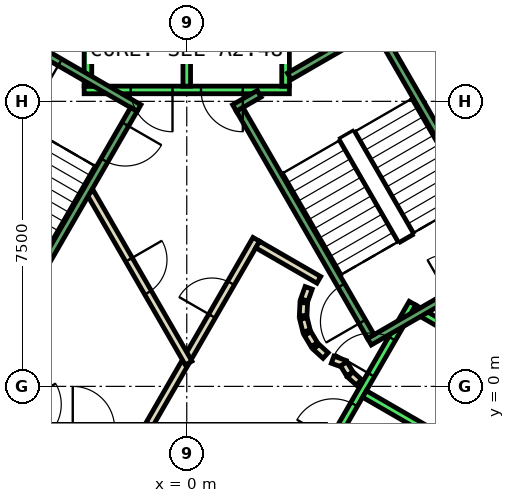
"""IFC4 building model, lengths in metres.
Left out: names, types, materials, properties, quantities, classifications, styles, units other than length and angle.
Written with IfcOpenShell. Run it as: python <this file> out.ifc"""

import sys

from ifc_helpers import new_model, si_unit, direction, frame, frame_2d, origin, place, context, subcontext, project, spatial, polyline, rectangle, outline, extrude, element, fill, save


model = new_model("IFC4")
c1 = context("Model", 3, precision=1e-05, world=origin(), true_north=direction((0.0, 1.0)))
c2 = subcontext(c1, "Body", "Model", "MODEL_VIEW")
j1 = project(units=[si_unit("LENGTHUNIT", "METRE"), si_unit("PLANEANGLEUNIT", "RADIAN")], contexts=[c1])
p1 = place(None, origin())
s1 = spatial("IfcSite", under=j1, at=p1, CompositionType="ELEMENT")
p2 = place(p1, origin())
s2 = spatial("IfcBuilding", under=s1, at=p2, CompositionType="ELEMENT")
p3 = place(p2, frame((0.0, 0.0, 231.8)))
s3 = spatial("IfcBuildingStorey", under=s2, at=p3, CompositionType="ELEMENT", Elevation=231.8)
p4 = place(p3, frame((0.0, 0.0, -0.4)))
e1 = element("IfcWall", 1, at=p4, inside=s3, PredefinedType="SHEAR", context=c2, shape_type="SweptSolid", body=[
    extrude(outline(polyline([(6.64, -9.0), (13.279, 2.5), (11.662, 2.5), (5.831, -7.6), (6.64, -9.0)])), origin(), (0.0, 0.0, 1.0), 4.0),
])
p5 = place(p3, frame((5.751, -3.938, 0.0), z_axis=(0.0, 0.0, 1.0), x_axis=(0.500034260056, 0.866005622828, 0.0)))
e2 = element("IfcWall", 2, at=p5, inside=s3, PredefinedType="PARTITIONING", context=c2, shape_type="SweptSolid", body=[
    extrude(rectangle(XDim=5.399, YDim=0.2, at=frame_2d((2.7, 0.0))), origin(), (0.0, 0.0, 1.0), 3.6),
])
p6 = place(p3, frame((-0.982, -1.0, 0.0), z_axis=(0.0, 0.0, 1.0), x_axis=(0.50024047865, 0.865886518847, 0.0)))
e3 = element("IfcWall", 3, at=p6, inside=s3, PredefinedType="PARTITIONING", context=c2, shape_type="SweptSolid", body=[
    extrude(rectangle(XDim=1.863, YDim=0.2, at=frame_2d((0.931, 0.0))), origin(), (0.0, 0.0, 1.0), 3.6),
])
p7 = place(p3, frame((0.05, 0.787, 0.0), z_axis=(0.0, 0.0, 1.0), x_axis=(0.499954076797, 0.866051915934, 0.0)))
e4 = element("IfcWall", 4, at=p7, inside=s3, PredefinedType="PARTITIONING", context=c2, shape_type="SweptSolid", body=[
    extrude(rectangle(XDim=3.558, YDim=0.2, at=frame_2d((1.779, 0.0))), origin(), (0.0, 0.0, 1.0), 3.6),
])
p8 = place(p7, frame((1.229, 0.0, 0.0)))
e5 = element("IfcOpeningElement", 5, at=p8, cuts=e4, PredefinedType="OPENING", context=c2, shape_type="SweptSolid", body=[
    extrude(rectangle(XDim=1.0, YDim=2.1, at=frame_2d((0.5, 1.05))), frame((0.0, 0.11, 0.0), z_axis=(0.0, -1.0, 0.0), x_axis=(1.0, 0.0, 0.0)), (0.0, 0.0, 1.0), 0.22),
])
p9 = place(p3, frame((1.866, 3.732, 0.0), z_axis=(0.0, 0.0, 1.0), x_axis=(0.866043361281, -0.499968895414, 0.0)))
e6 = element("IfcWall", 6, at=p9, inside=s3, PredefinedType="PARTITIONING", context=c2, shape_type="SweptSolid", body=[
    extrude(rectangle(XDim=1.858, YDim=0.2, at=frame_2d((0.929, 0.0))), origin(), (0.0, 0.0, 1.0), 3.6),
])
p10 = place(p3, frame((3.208, 2.592, 0.0), z_axis=(0.0, 0.0, 1.0), x_axis=(-0.337388820924, -0.941365382578, 0.0)))
e7 = element("IfcWall", 7, at=p10, inside=s3, PredefinedType="PARTITIONING", context=c2, shape_type="SweptSolid", body=[
    extrude(rectangle(XDim=0.338, YDim=0.2, at=frame_2d((0.169, 0.0))), origin(), (0.0, 0.0, 1.0), 3.6),
])
p11 = place(p3, frame((3.079, 2.199, 0.0), z_axis=(0.0, 0.0, 1.0), x_axis=(-0.047771483479, -0.998858290933, 0.0)))
e8 = element("IfcWall", 8, at=p11, inside=s3, PredefinedType="PARTITIONING", context=c2, shape_type="SweptSolid", body=[
    extrude(rectangle(XDim=0.337, YDim=0.2, at=frame_2d((0.169, 0.0))), origin(), (0.0, 0.0, 1.0), 3.6),
])
p12 = place(p3, frame((3.07, 1.786, 0.0), z_axis=(0.0, 0.0, 1.0), x_axis=(0.242705583207, -0.970099994784, 0.0)))
e9 = element("IfcWall", 9, at=p12, inside=s3, PredefinedType="PARTITIONING", context=c2, shape_type="SweptSolid", body=[
    extrude(rectangle(XDim=0.338, YDim=0.2, at=frame_2d((0.169, 0.0))), origin(), (0.0, 0.0, 1.0), 3.6),
])
for number, where, z_axis, x_axis in (
    (10, (3.182, 1.388, 0.0), (0.0, 0.0, 1.0), (0.512, -0.859, 0.0)),
    (11, (3.404, 1.039, 0.0), (0.0, 0.0, 1.0), (0.74, -0.672, 0.0)),
):
    element("IfcWall", number, at=place(p3, frame(where, z_axis=z_axis, x_axis=x_axis)), inside=s3, PredefinedType="PARTITIONING", context=c2, shape_type="SweptSolid", body=[
        extrude(rectangle(XDim=0.338, YDim=0.2, at=frame_2d((0.169, 0.0))), origin(), (0.0, 0.0, 1.0), 3.6),
    ])
p13 = place(p3, frame((3.838, 0.702, 0.0), z_axis=(0.0, 0.0, 1.0), x_axis=(0.941035081519, -0.338308993895, 0.0)))
e12 = element("IfcWall", 12, at=p13, inside=s3, PredefinedType="PARTITIONING", context=c2, shape_type="SweptSolid", body=[
    extrude(rectangle(XDim=0.337, YDim=0.2, at=frame_2d((0.168, 0.0))), origin(), (0.0, 0.0, 1.0), 3.6),
])
p14 = place(p3, frame((4.132, 0.593, 0.0), z_axis=(0.0, 0.0, 1.0), x_axis=(0.513561617048, -0.858052717201, 0.0)))
e13 = element("IfcWall", 13, at=p14, inside=s3, PredefinedType="PARTITIONING", context=c2, shape_type="SweptSolid", body=[
    extrude(rectangle(XDim=0.308, YDim=0.2, at=frame_2d((0.154, 0.0))), origin(), (0.0, 0.0, 1.0), 3.6),
])
p15 = place(p3, frame((4.301, 0.315, 0.0), z_axis=(0.0, 0.0, 1.0), x_axis=(0.741798017506, -0.670623367639, 0.0)))
e14 = element("IfcWall", 14, at=p15, inside=s3, PredefinedType="PARTITIONING", context=c2, shape_type="SweptSolid", body=[
    extrude(rectangle(XDim=0.309, YDim=0.2, at=frame_2d((0.154, 0.0))), origin(), (0.0, 0.0, 1.0), 3.6),
])
p16 = place(p3, frame((-2.54, 5.1, 0.0), z_axis=(0.0, 0.0, 1.0), x_axis=(0.499925051871, -0.866068670783, 0.0)))
e15 = element("IfcWall", 15, at=p16, inside=s3, PredefinedType="PARTITIONING", context=c2, shape_type="SweptSolid", body=[
    extrude(rectangle(XDim=5.181, YDim=0.2, at=frame_2d((2.59, 0.0))), origin(), (0.0, 0.0, 1.0), 3.6),
])
p17 = place(p16, frame((2.04, 0.0, 0.0)))
e16 = element("IfcOpeningElement", 16, at=p17, cuts=e15, PredefinedType="OPENING", context=c2, shape_type="SweptSolid", body=[
    extrude(rectangle(XDim=1.0, YDim=2.1, at=frame_2d((0.5, 1.05))), frame((0.0, 0.11, 0.0), z_axis=(0.0, -1.0, 0.0), x_axis=(1.0, 0.0, 0.0)), (0.0, 0.0, 1.0), 0.22),
])
p18 = place(p3, frame((2.7, 7.8, 0.0), z_axis=(0.0, 0.0, 1.0), x_axis=(-1.0, 0.0, 0.0)))
e17 = element("IfcWall", 17, at=p18, inside=s3, PredefinedType="STANDARD", context=c2, shape_type="SweptSolid", body=[
    extrude(rectangle(XDim=5.4, YDim=0.2, at=frame_2d((2.7, 0.0))), origin(), (0.0, 0.0, 1.0), 3.6),
])
p19 = place(p18, frame((1.225, 0.0, 0.0)))
e18 = element("IfcOpeningElement", 18, at=p19, cuts=e17, PredefinedType="OPENING", context=c2, shape_type="SweptSolid", body=[
    extrude(rectangle(XDim=1.1, YDim=2.1, at=frame_2d((0.55, 1.05))), frame((0.0, 0.11, 0.0), z_axis=(0.0, -1.0, 0.0), x_axis=(1.0, 0.0, 0.0)), (0.0, 0.0, 1.0), 0.22),
])
p20 = place(p18, frame((3.075, 0.0, 0.0)))
e19 = element("IfcOpeningElement", 19, at=p20, cuts=e17, PredefinedType="OPENING", context=c2, shape_type="SweptSolid", body=[
    extrude(rectangle(XDim=1.1, YDim=2.1, at=frame_2d((0.55, 1.05))), frame((0.0, 0.11, 0.0), z_axis=(0.0, -1.0, 0.0), x_axis=(1.0, 0.0, 0.0)), (0.0, 0.0, 1.0), 0.22),
])
for number, where, z_axis, x_axis in (
    (20, (2.6, 7.9, 0.0), (0.0, 0.0, 1.0), (0.0, 1.0, 0.0)),
    (21, (0.0, 7.9, 0.0), (0.0, 0.0, 1.0), (0.0, 1.0, 0.0)),
    (22, (-2.6, 7.9, 0.0), (0.0, 0.0, 1.0), (0.0, 1.0, 0.0)),
):
    element("IfcWall", number, at=place(p3, frame(where, z_axis=z_axis, x_axis=x_axis)), inside=s3, PredefinedType="STANDARD", context=c2, shape_type="SweptSolid", body=[
        extrude(rectangle(XDim=2.4, YDim=0.2, at=frame_2d((1.2, 0.0))), origin(), (0.0, 0.0, 1.0), 3.6),
    ])
p21 = place(p3, frame((-5.94, 2.188, 0.0), z_axis=(0.0, 0.0, 1.0), x_axis=(0.500034260056, -0.866005622828, 0.0)))
e23 = element("IfcWall", 23, at=p21, inside=s3, PredefinedType="STANDARD", context=c2, shape_type="SweptSolid", body=[
    extrude(rectangle(XDim=5.399, YDim=0.2, at=frame_2d((2.7, 0.0))), origin(), (0.0, 0.0, 1.0), 3.6),
])
p22 = place(p21, frame((3.075, 0.0, 0.0)))
e24 = element("IfcOpeningElement", 24, at=p22, cuts=e23, PredefinedType="OPENING", context=c2, shape_type="SweptSolid", body=[
    extrude(rectangle(XDim=1.1, YDim=2.1, at=frame_2d((0.55, 1.05))), frame((0.0, 0.11, 0.0), z_axis=(0.0, -1.0, 0.0), x_axis=(1.0, 0.0, 0.0)), (0.0, 0.0, 1.0), 0.22),
])
p23 = place(p21, frame((1.225, 0.0, 0.0)))
e25 = element("IfcOpeningElement", 25, at=p23, cuts=e23, PredefinedType="OPENING", context=c2, shape_type="SweptSolid", body=[
    extrude(rectangle(XDim=1.1, YDim=2.1, at=frame_2d((0.55, 1.05))), frame((0.0, 0.11, 0.0), z_axis=(0.0, -1.0, 0.0), x_axis=(1.0, 0.0, 0.0)), (0.0, 0.0, 1.0), 0.22),
])
p24 = place(p3, frame((3.24, -2.488, 0.0), z_axis=(0.0, 0.0, 1.0), x_axis=(0.500034260056, 0.866005622828, 0.0)))
e26 = element("IfcWall", 26, at=p24, inside=s3, PredefinedType="STANDARD", context=c2, shape_type="SweptSolid", body=[
    extrude(rectangle(XDim=5.399, YDim=0.2, at=frame_2d((2.7, 0.0))), origin(), (0.0, 0.0, 1.0), 3.6),
])
p25 = place(p24, frame((3.225, 0.0, 0.0)))
e27 = element("IfcOpeningElement", 27, at=p25, cuts=e26, PredefinedType="OPENING", context=c2, shape_type="SweptSolid", body=[
    extrude(rectangle(XDim=1.1, YDim=2.1, at=frame_2d((0.55, 1.05))), frame((0.0, 0.11, 0.0), z_axis=(0.0, -1.0, 0.0), x_axis=(1.0, 0.0, 0.0)), (0.0, 0.0, 1.0), 0.22),
])
p26 = place(p24, frame((1.225, 0.0, 0.0)))
e28 = element("IfcOpeningElement", 28, at=p26, cuts=e26, PredefinedType="OPENING", context=c2, shape_type="SweptSolid", body=[
    extrude(rectangle(XDim=1.1, YDim=2.1, at=frame_2d((0.55, 1.05))), frame((0.0, 0.11, 0.0), z_axis=(0.0, -1.0, 0.0), x_axis=(1.0, 0.0, 0.0)), (0.0, 0.0, 1.0), 0.22),
])
p27 = place(p3, frame((5.492, -3.788, 0.0), z_axis=(0.0, 0.0, 1.0), x_axis=(0.500034260056, 0.866005622828, 0.0)))
e29 = element("IfcWall", 29, at=p27, inside=s3, PredefinedType="STANDARD", context=c2, shape_type="SweptSolid", body=[
    extrude(rectangle(XDim=5.399, YDim=0.2, at=frame_2d((2.7, 0.0))), origin(), (0.0, 0.0, 1.0), 3.6),
])
for number, where, z_axis, x_axis in (
    (30, (4.677, -0.2, 0.0), (0.0, 0.0, 1.0), (0.866, -0.5, 0.0)),
    (31, (5.977, 2.052, 0.0), (0.0, 0.0, 1.0), (0.866, -0.5, 0.0)),
):
    element("IfcWall", number, at=place(p3, frame(where, z_axis=z_axis, x_axis=x_axis)), inside=s3, PredefinedType="STANDARD", context=c2, shape_type="SweptSolid", body=[
        extrude(rectangle(XDim=2.399, YDim=0.2, at=frame_2d((1.2, 0.0))), origin(), (0.0, 0.0, 1.0), 3.6),
    ])
p28 = place(p3, frame((4.806, 1.176, 0.0), z_axis=(0.0, 0.0, 1.0), x_axis=(0.866059941101, 0.499940174841, 0.0)))
e32 = element("IfcWall", 32, at=p28, inside=s3, PredefinedType="STANDARD", context=c2, shape_type="SweptSolid", body=[
    extrude(rectangle(XDim=4.4, YDim=0.2, at=frame_2d((2.2, 0.0))), origin(), (0.0, 0.0, 1.0), 3.6),
])
p29 = place(p28, frame((2.4, 0.0, 0.0)))
e33 = element("IfcOpeningElement", 33, at=p29, cuts=e32, PredefinedType="OPENING", context=c2, shape_type="SweptSolid", body=[
    extrude(rectangle(XDim=1.1, YDim=2.2, at=frame_2d((0.55, 1.1))), frame((0.0, 0.11, 0.0), z_axis=(0.0, -1.0, 0.0), x_axis=(1.0, 0.0, 0.0)), (0.0, 0.0, 1.0), 0.22),
])
p30 = place(p3, frame((2.7, 8.158, 0.0), z_axis=(0.0, 0.0, 1.0), x_axis=(0.86611865017, 0.499838457731, 0.0)))
e34 = element("IfcWall", 34, at=p30, inside=s3, PredefinedType="STANDARD", context=c2, shape_type="SweptSolid", body=[
    extrude(rectangle(XDim=2.733, YDim=0.2, at=frame_2d((1.366, 0.0))), origin(), (0.0, 0.0, 1.0), 3.6),
])
p31 = place(p3, frame((1.256, 7.324, 0.0), z_axis=(0.0, 0.0, 1.0), x_axis=(0.865915093549, 0.500191014278, 0.0)))
e35 = element("IfcWall", 35, at=p31, inside=s3, PredefinedType="STANDARD", context=c2, shape_type="SweptSolid", body=[
    extrude(rectangle(XDim=0.752, YDim=0.2, at=frame_2d((0.376, 0.0))), origin(), (0.0, 0.0, 1.0), 3.6),
])
p32 = place(p3, frame((4.843, 1.312, 0.0), z_axis=(0.0, 0.0, 1.0), x_axis=(-0.499963383562, 0.866046543262, 0.0)))
e36 = element("IfcWall", 36, at=p32, inside=s3, PredefinedType="STANDARD", context=c2, shape_type="SweptSolid", body=[
    extrude(rectangle(XDim=6.9, YDim=0.2, at=frame_2d((3.45, 0.0))), origin(), (0.0, 0.0, 1.0), 3.6),
])
p33 = place(p32, frame((0.45, 0.0, 0.0)))
e37 = element("IfcOpeningElement", 37, at=p33, cuts=e36, PredefinedType="OPENING", context=c2, shape_type="SweptSolid", body=[
    extrude(rectangle(XDim=1.1, YDim=2.2, at=frame_2d((0.55, 1.1))), frame((0.0, 0.11, 0.0), z_axis=(0.0, -1.0, 0.0), x_axis=(1.0, 0.0, 0.0)), (0.0, 0.0, 1.0), 0.22),
])
p34 = place(p3, frame((8.48, 3.412, 0.0), z_axis=(0.0, 0.0, 1.0), x_axis=(-0.499978703459, 0.866037698999, 0.0)))
e38 = element("IfcWall", 38, at=p34, inside=s3, PredefinedType="STANDARD", context=c2, shape_type="SweptSolid", body=[
    extrude(rectangle(XDim=6.9, YDim=0.2, at=frame_2d((3.45, 0.0))), origin(), (0.0, 0.0, 1.0), 3.6),
])
p35 = place(p3, frame((-1.256, 7.324, 0.0), z_axis=(0.0, 0.0, 1.0), x_axis=(-0.866046073146, 0.499964197906, 0.0)))
e39 = element("IfcWall", 39, at=p35, inside=s3, PredefinedType="STANDARD", context=c2, shape_type="SweptSolid", body=[
    extrude(rectangle(XDim=4.4, YDim=0.2, at=frame_2d((2.2, 0.0))), origin(), (0.0, 0.0, 1.0), 3.6),
])
p36 = place(p35, frame((2.4, 0.0, 0.0)))
e40 = element("IfcOpeningElement", 40, at=p36, cuts=e39, PredefinedType="OPENING", context=c2, shape_type="SweptSolid", body=[
    extrude(rectangle(XDim=1.1, YDim=2.2, at=frame_2d((0.55, 1.1))), frame((0.0, 0.11, 0.0), z_axis=(0.0, -1.0, 0.0), x_axis=(1.0, 0.0, 0.0)), (0.0, 0.0, 1.0), 0.22),
])
p37 = place(p3, frame((-1.393, 7.288, 0.0), z_axis=(0.0, 0.0, 1.0), x_axis=(-0.499963383562, -0.866046543262, 0.0)))
e41 = element("IfcWall", 41, at=p37, inside=s3, PredefinedType="STANDARD", context=c2, shape_type="SweptSolid", body=[
    extrude(rectangle(XDim=6.9, YDim=0.2, at=frame_2d((3.45, 0.0))), origin(), (0.0, 0.0, 1.0), 3.6),
])
p38 = place(p37, frame((0.45, 0.0, 0.0)))
e42 = element("IfcOpeningElement", 42, at=p38, cuts=e41, PredefinedType="OPENING", context=c2, shape_type="SweptSolid", body=[
    extrude(rectangle(XDim=1.1, YDim=2.2, at=frame_2d((0.55, 1.1))), frame((0.0, 0.11, 0.0), z_axis=(0.0, -1.0, 0.0), x_axis=(1.0, 0.0, 0.0)), (0.0, 0.0, 1.0), 0.22),
])
p39 = place(p8, origin())
e43 = element("IfcDoor", 43, at=p39, inside=s3, OperationType="SINGLE_SWING_RIGHT", PredefinedType="DOOR", context=c2, shape_type="SweptSolid", body=[
    extrude(rectangle(XDim=1.0, YDim=2.1, at=frame_2d((0.5, 1.05))), frame((0.0, 0.025, 0.0), z_axis=(0.0, -1.0, 0.0), x_axis=(1.0, 0.0, 0.0)), (0.0, 0.0, 1.0), 0.05),
])
fill(e5, e43)
p40 = place(p17, origin())
e44 = element("IfcDoor", 44, at=p40, inside=s3, OperationType="SINGLE_SWING_RIGHT", PredefinedType="DOOR", context=c2, shape_type="SweptSolid", body=[
    extrude(rectangle(XDim=1.0, YDim=2.1, at=frame_2d((0.5, 1.05))), frame((0.0, 0.025, 0.0), z_axis=(0.0, -1.0, 0.0), x_axis=(1.0, 0.0, 0.0)), (0.0, 0.0, 1.0), 0.05),
])
fill(e16, e44)
p41 = place(p19, origin())
e45 = element("IfcDoor", 45, at=p41, inside=s3, OperationType="SLIDING_TO_LEFT", PredefinedType="DOOR", context=c2, shape_type="SweptSolid", body=[
    extrude(rectangle(XDim=1.1, YDim=2.1, at=frame_2d((0.55, 1.05))), frame((0.0, 0.025, 0.0), z_axis=(0.0, -1.0, 0.0), x_axis=(1.0, 0.0, 0.0)), (0.0, 0.0, 1.0), 0.05),
])
fill(e18, e45)
p42 = place(p20, origin())
e46 = element("IfcDoor", 46, at=p42, inside=s3, OperationType="SLIDING_TO_LEFT", PredefinedType="DOOR", context=c2, shape_type="SweptSolid", body=[
    extrude(rectangle(XDim=1.1, YDim=2.1, at=frame_2d((0.55, 1.05))), frame((0.0, 0.025, 0.0), z_axis=(0.0, -1.0, 0.0), x_axis=(1.0, 0.0, 0.0)), (0.0, 0.0, 1.0), 0.05),
])
fill(e19, e46)
p43 = place(p25, origin())
e47 = element("IfcDoor", 47, at=p43, inside=s3, OperationType="SLIDING_TO_LEFT", PredefinedType="DOOR", context=c2, shape_type="SweptSolid", body=[
    extrude(rectangle(XDim=1.1, YDim=2.1, at=frame_2d((0.55, 1.05))), frame((0.0, 0.025, 0.0), z_axis=(0.0, -1.0, 0.0), x_axis=(1.0, 0.0, 0.0)), (0.0, 0.0, 1.0), 0.05),
])
fill(e27, e47)
p44 = place(p26, origin())
e48 = element("IfcDoor", 48, at=p44, inside=s3, OperationType="SLIDING_TO_LEFT", PredefinedType="DOOR", context=c2, shape_type="SweptSolid", body=[
    extrude(rectangle(XDim=1.1, YDim=2.1, at=frame_2d((0.55, 1.05))), frame((0.0, 0.025, 0.0), z_axis=(0.0, -1.0, 0.0), x_axis=(1.0, 0.0, 0.0)), (0.0, 0.0, 1.0), 0.05),
])
fill(e28, e48)
p45 = place(p33, origin())
e49 = element("IfcDoor", 49, at=p45, inside=s3, OperationType="SINGLE_SWING_LEFT", PredefinedType="DOOR", context=c2, shape_type="SweptSolid", body=[
    extrude(rectangle(XDim=1.1, YDim=2.2, at=frame_2d((0.55, 1.1))), frame((0.0, 0.025, 0.0), z_axis=(0.0, -1.0, 0.0), x_axis=(1.0, 0.0, 0.0)), (0.0, 0.0, 1.0), 0.05),
])
fill(e37, e49)
p46 = place(p38, origin())
e50 = element("IfcDoor", 50, at=p46, inside=s3, OperationType="SINGLE_SWING_LEFT", PredefinedType="DOOR", context=c2, shape_type="SweptSolid", body=[
    extrude(rectangle(XDim=1.1, YDim=2.2, at=frame_2d((0.55, 1.1))), frame((0.0, 0.025, 0.0), z_axis=(0.0, -1.0, 0.0), x_axis=(1.0, 0.0, 0.0)), (0.0, 0.0, 1.0), 0.05),
])
fill(e42, e50)
p47 = place(p36, origin())
e51 = element("IfcDoor", 51, at=p47, inside=s3, OperationType="SINGLE_SWING_LEFT", PredefinedType="DOOR", context=c2, shape_type="SweptSolid", body=[
    extrude(rectangle(XDim=1.1, YDim=2.2, at=frame_2d((0.55, 1.1))), frame((0.0, 0.025, 0.0), z_axis=(0.0, -1.0, 0.0), x_axis=(1.0, 0.0, 0.0)), (0.0, 0.0, 1.0), 0.05),
])
fill(e40, e51)
save(model, sys.argv[1])
